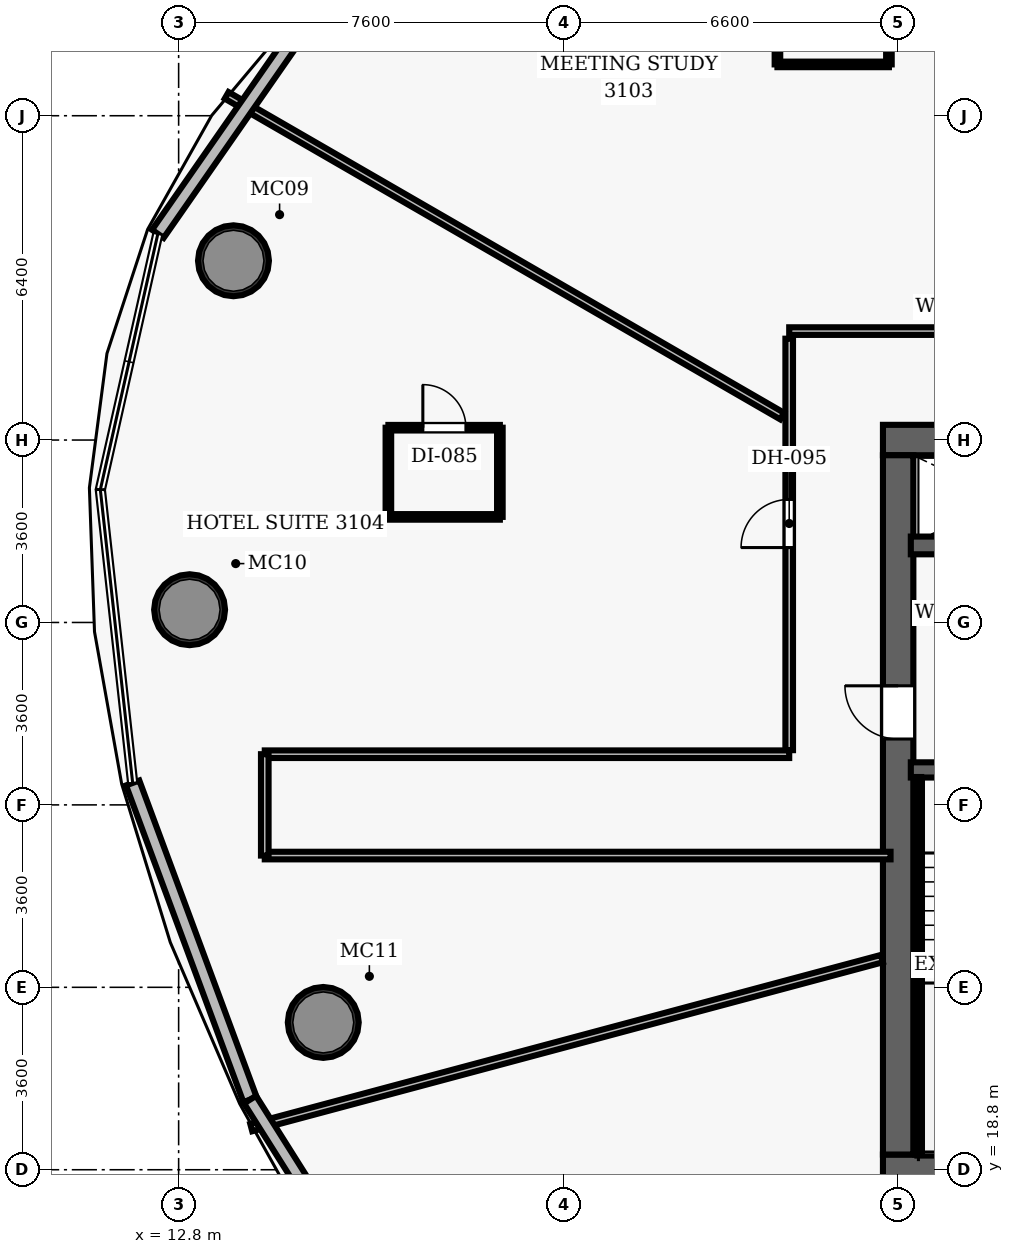
"""IFC4 building model, lengths in metres.
Left out: names, types, materials, properties, quantities, classifications, styles, units other than length and angle.
Written with IfcOpenShell. Run it as: python <this file> out.ifc"""

import sys

from ifc_helpers import new_model, si_unit, direction, frame, frame_2d, origin, origin_2d, place, context, subcontext, project, spatial, rectangle, hollow_circle, extrude, element, fill, save


model = new_model("IFC4")
c1 = context("Model", 3, precision=1e-05, world=origin(), true_north=direction((0.0, 1.0)))
c2 = subcontext(c1, "Body", "Model", "MODEL_VIEW")
j1 = project(units=[si_unit("LENGTHUNIT", "METRE"), si_unit("PLANEANGLEUNIT", "RADIAN")], contexts=[c1])
p1 = place(None, origin())
s1 = spatial("IfcSite", under=j1, at=p1, CompositionType="ELEMENT")
p2 = place(p1, origin())
s2 = spatial("IfcBuilding", under=s1, at=p2, CompositionType="ELEMENT")
p3 = place(p2, frame((0.0, 0.0, 127.3)))
s3 = spatial("IfcBuildingStorey", under=s2, at=p3, CompositionType="ELEMENT", Elevation=127.3)
p4 = place(p3, frame((26.7, 18.8, 0.0), z_axis=(0.0, 0.0, 1.0), x_axis=(1.0, 0.0, 0.0)))
e1 = element("IfcWall", 1, at=p4, inside=s3, PredefinedType="SHEAR", context=c2, shape_type="SweptSolid", body=[
    extrude(rectangle(XDim=22.6, YDim=0.6, at=frame_2d((11.3, 0.0))), origin(), (0.0, 0.0, 1.0), 3.5),
])
p5 = place(p4, frame((14.52, 0.0, 0.0)))
e2 = element("IfcOpeningElement", 2, at=p5, cuts=e1, PredefinedType="OPENING", context=c2, shape_type="SweptSolid", body=[
    extrude(rectangle(XDim=1.05, YDim=2.15, at=frame_2d((0.525, 1.075))), frame((0.0, 0.31, 0.0), z_axis=(0.0, -1.0, 0.0), x_axis=(1.0, 0.0, 0.0)), (0.0, 0.0, 1.0), 0.62),
])
p6 = place(p3, frame((26.7, 33.2, 0.0), z_axis=(0.0, 0.0, 1.0), x_axis=(1.0, 0.0, 0.0)))
e3 = element("IfcWall", 3, at=p6, inside=s3, PredefinedType="SHEAR", context=c2, shape_type="SweptSolid", body=[
    extrude(rectangle(XDim=22.6, YDim=0.6, at=frame_2d((11.3, 0.0))), origin(), (0.0, 0.0, 1.0), 3.5),
])
p7 = place(p6, frame((4.62, 0.0, 0.0)))
e4 = element("IfcOpeningElement", 4, at=p7, cuts=e3, PredefinedType="OPENING", context=c2, shape_type="SweptSolid", body=[
    extrude(rectangle(XDim=1.05, YDim=2.15, at=frame_2d((0.525, 1.075))), frame((0.0, 0.31, 0.0), z_axis=(0.0, -1.0, 0.0), x_axis=(1.0, 0.0, 0.0)), (0.0, 0.0, 1.0), 0.62),
])
p8 = place(p6, frame((14.52, 0.0, 0.0)))
e5 = element("IfcOpeningElement", 5, at=p8, cuts=e3, PredefinedType="OPENING", context=c2, shape_type="SweptSolid", body=[
    extrude(rectangle(XDim=1.05, YDim=2.15, at=frame_2d((0.525, 1.075))), frame((0.0, 0.31, 0.0), z_axis=(0.0, -1.0, 0.0), x_axis=(1.0, 0.0, 0.0)), (0.0, 0.0, 1.0), 0.62),
])
p9 = place(p3, frame((27.0, 19.1, 0.0), z_axis=(0.0, 0.0, 1.0), x_axis=(0.0, 1.0, 0.0)))
e6 = element("IfcWall", 6, at=p9, inside=s3, PredefinedType="SHEAR", context=c2, shape_type="SweptSolid", body=[
    extrude(rectangle(XDim=13.8, YDim=0.6, at=frame_2d((6.9, 0.0))), origin(), (0.0, 0.0, 1.0), 3.5),
])
p10 = place(p9, frame((8.2, 0.0, 0.0)))
e7 = element("IfcOpeningElement", 7, at=p10, cuts=e6, PredefinedType="OPENING", context=c2, shape_type="SweptSolid", body=[
    extrude(rectangle(XDim=1.05, YDim=2.15, at=frame_2d((0.525, 1.075))), frame((0.0, 0.31, 0.0), z_axis=(0.0, -1.0, 0.0), x_axis=(1.0, 0.0, 0.0)), (0.0, 0.0, 1.0), 0.62),
])
for number, where, z_axis, x_axis in (
    (8, (13.882, 36.738, 0.0), (0.0, 0.0, 1.0), (1.0, 0.0, 0.0)),
    (9, (13.016, 29.852, 0.0), (0.0, 0.0, 1.0), (1.0, 0.0, 0.0)),
    (10, (15.654, 21.707, 0.0), (0.0, 0.0, 1.0), (1.0, 0.0, 0.0)),
):
    element("IfcColumn", number, at=place(p3, frame(where, z_axis=z_axis, x_axis=x_axis)), inside=s3, PredefinedType="COLUMN", context=c2, shape_type="SweptSolid", body=[
        extrude(hollow_circle(Radius=0.7, WallThickness=0.055, at=origin_2d()), origin(), (0.0, 0.0, 1.0), 3.5),
    ])
p11 = place(p3, frame((27.25, 26.69, 0.0), z_axis=(0.0, 0.0, 1.0), x_axis=(1.0, 0.0, 0.0)))
e11 = element("IfcWall", 11, at=p11, inside=s3, PredefinedType="SHEAR", context=c2, shape_type="SweptSolid", body=[
    extrude(rectangle(XDim=3.67, YDim=0.3, at=frame_2d((1.835, 0.0))), origin(), (0.0, 0.0, 1.0), 3.5),
])
p12 = place(p11, frame((1.05, 0.0, 0.0)))
e12 = element("IfcOpeningElement", 12, at=p12, cuts=e11, PredefinedType="OPENING", context=c2, shape_type="SweptSolid", body=[
    extrude(rectangle(XDim=1.1, YDim=2.15, at=frame_2d((0.55, 1.075))), frame((0.0, 0.16, 0.0), z_axis=(0.0, -1.0, 0.0), x_axis=(1.0, 0.0, 0.0)), (0.0, 0.0, 1.0), 0.32),
])
p13 = place(p3, frame((27.395, 19.1, 0.0), z_axis=(0.0, 0.0, 1.0), x_axis=(0.0, 1.0, 0.0)))
e13 = element("IfcWall", 13, at=p13, inside=s3, PredefinedType="SHEAR", context=c2, shape_type="SweptSolid", body=[
    extrude(rectangle(XDim=7.45, YDim=0.12, at=frame_2d((3.725, 0.0))), origin(), (0.0, 0.0, 1.0), 3.5),
])
p14 = place(p3, frame((27.395, 19.16, 0.0), z_axis=(0.0, 0.0, 1.0), x_axis=(1.0, 0.0, 0.0)))
e14 = element("IfcWall", 14, at=p14, inside=s3, PredefinedType="SHEAR", context=c2, shape_type="SweptSolid", body=[
    extrude(rectangle(XDim=3.095, YDim=0.12, at=frame_2d((1.547, 0.0))), origin(), (0.0, 0.0, 1.0), 3.5),
])
p15 = place(p3, frame((27.25, 31.12, 0.0), z_axis=(0.0, 0.0, 1.0), x_axis=(1.0, 0.0, 0.0)))
e15 = element("IfcWall", 15, at=p15, inside=s3, PredefinedType="SHEAR", context=c2, shape_type="SweptSolid", body=[
    extrude(rectangle(XDim=3.67, YDim=0.35, at=frame_2d((1.835, 0.0))), origin(), (0.0, 0.0, 1.0), 2.675),
])
p16 = place(p15, frame((1.25, 0.0, 0.0)))
e16 = element("IfcOpeningElement", 16, at=p16, cuts=e15, PredefinedType="OPENING", context=c2, shape_type="SweptSolid", body=[
    extrude(rectangle(XDim=1.1, YDim=2.15, at=frame_2d((0.55, 1.075))), frame((0.0, 0.185, 0.0), z_axis=(0.0, -1.0, 0.0), x_axis=(1.0, 0.0, 0.0)), (0.0, 0.0, 1.0), 0.37),
])
p17 = place(p3, frame((24.85, 35.35, 0.0), z_axis=(0.0, 0.0, 1.0), x_axis=(1.0, 0.0, 0.0)))
e17 = element("IfcWall", 17, at=p17, inside=s3, PredefinedType="PARTITIONING", context=c2, shape_type="SweptSolid", body=[
    extrude(rectangle(XDim=26.0, YDim=0.15, at=frame_2d((13.0, 0.0))), origin(), (0.0, 0.0, 1.0), 2.675),
])
p18 = place(p17, frame((19.766, 0.0, 0.0)))
e18 = element("IfcOpeningElement", 18, at=p18, cuts=e17, PredefinedType="OPENING", context=c2, shape_type="SweptSolid", body=[
    extrude(rectangle(XDim=0.95, YDim=2.15, at=frame_2d((0.475, 1.075))), frame((0.0, 0.085, 0.0), z_axis=(0.0, -1.0, 0.0), x_axis=(1.0, 0.0, 0.0)), (0.0, 0.0, 1.0), 0.17),
])
p19 = place(p17, frame((12.852, 0.0, 0.0)))
e19 = element("IfcOpeningElement", 19, at=p19, cuts=e17, PredefinedType="OPENING", context=c2, shape_type="SweptSolid", body=[
    extrude(rectangle(XDim=0.95, YDim=2.15, at=frame_2d((0.475, 1.075))), frame((0.0, 0.085, 0.0), z_axis=(0.0, -1.0, 0.0), x_axis=(1.0, 0.0, 0.0)), (0.0, 0.0, 1.0), 0.17),
])
p20 = place(p17, frame((6.616, 0.0, 0.0)))
e20 = element("IfcOpeningElement", 20, at=p20, cuts=e17, PredefinedType="OPENING", context=c2, shape_type="SweptSolid", body=[
    extrude(rectangle(XDim=0.95, YDim=2.15, at=frame_2d((0.475, 1.075))), frame((0.0, 0.085, 0.0), z_axis=(0.0, -1.0, 0.0), x_axis=(1.0, 0.0, 0.0)), (0.0, 0.0, 1.0), 0.17),
])
p21 = place(p3, frame((24.85, 27.08, 0.0), z_axis=(0.0, 0.0, 1.0), x_axis=(0.0, 1.0, 0.0)))
e21 = element("IfcWall", 21, at=p21, inside=s3, PredefinedType="PARTITIONING", context=c2, shape_type="SweptSolid", body=[
    extrude(rectangle(XDim=8.12, YDim=0.15, at=frame_2d((4.06, 0.0))), origin(), (0.0, 0.0, 1.0), 2.675),
])
p22 = place(p21, frame((3.998, 0.0, 0.0)))
e22 = element("IfcOpeningElement", 22, at=p22, cuts=e21, PredefinedType="OPENING", context=c2, shape_type="SweptSolid", body=[
    extrude(rectangle(XDim=0.95, YDim=2.15, at=frame_2d((0.475, 1.075))), frame((0.0, 0.085, 0.0), z_axis=(0.0, -1.0, 0.0), x_axis=(1.0, 0.0, 0.0)), (0.0, 0.0, 1.0), 0.17),
])
p23 = place(p3, frame((14.5, 27.0, 0.0), z_axis=(0.0, 0.0, 1.0), x_axis=(1.0, 0.0, 0.0)))
e23 = element("IfcWall", 23, at=p23, inside=s3, PredefinedType="PARTITIONING", context=c2, shape_type="SweptSolid", body=[
    extrude(rectangle(XDim=10.35, YDim=0.15, at=frame_2d((5.175, 0.0))), origin(), (0.0, 0.0, 1.0), 2.675),
])
p24 = place(p3, frame((14.5, 25.0, 0.0), z_axis=(0.0, 0.0, 1.0), x_axis=(1.0, 0.0, 0.0)))
e24 = element("IfcWall", 24, at=p24, inside=s3, PredefinedType="PARTITIONING", context=c2, shape_type="SweptSolid", body=[
    extrude(rectangle(XDim=12.35, YDim=0.15, at=frame_2d((6.175, 0.0))), origin(), (0.0, 0.0, 1.0), 2.675),
])
p25 = place(p3, frame((14.5, 25.0, 0.0), z_axis=(0.0, 0.0, 1.0), x_axis=(0.0, 1.0, 0.0)))
e25 = element("IfcWall", 25, at=p25, inside=s3, PredefinedType="PARTITIONING", context=c2, shape_type="SweptSolid", body=[
    extrude(rectangle(XDim=2.0, YDim=0.15, at=frame_2d((1.0, 0.0))), origin(), (0.0, 0.0, 1.0), 2.675),
])
p26 = place(p3, frame((24.71, 33.673, 0.0), z_axis=(0.0, 0.0, 1.0), x_axis=(-0.866026921982, 0.499997370395, 0.0)))
e26 = element("IfcWall", 26, at=p26, inside=s3, PredefinedType="PARTITIONING", context=c2, shape_type="SweptSolid", body=[
    extrude(rectangle(XDim=12.658, YDim=0.15, at=frame_2d((6.329, 0.0))), origin(), (0.0, 0.0, 1.0), 2.675),
])
p27 = place(p3, frame((26.68, 22.967, 0.0), z_axis=(0.0, 0.0, 1.0), x_axis=(-0.965923864026, -0.258826368257, 0.0)))
e27 = element("IfcWall", 27, at=p27, inside=s3, PredefinedType="PARTITIONING", context=c2, shape_type="SweptSolid", body=[
    extrude(rectangle(XDim=12.886, YDim=0.15, at=frame_2d((6.443, 0.0))), origin(), (0.0, 0.0, 1.0), 2.675),
])
p28 = place(p3, frame((24.618, 40.613, 0.0), z_axis=(0.0, 0.0, 1.0), x_axis=(1.0, 0.0, 0.0)))
e28 = element("IfcWall", 28, at=p28, inside=s3, PredefinedType="PARTITIONING", context=c2, shape_type="SweptSolid", body=[
    extrude(rectangle(XDim=2.2, YDim=0.11, at=frame_2d((1.1, 0.0))), origin(), (0.0, 0.0, 1.0), 2.675),
])
for number, where, z_axis, x_axis in (
    (29, (24.618, 40.613, 0.0), (0.0, 0.0, 1.0), (0.0, 1.0, 0.0)),
    (30, (26.818, 40.613, 0.0), (0.0, 0.0, 1.0), (0.0, 1.0, 0.0)),
):
    element("IfcWall", number, at=place(p3, frame(where, z_axis=z_axis, x_axis=x_axis)), inside=s3, PredefinedType="PARTITIONING", context=c2, shape_type="SweptSolid", body=[
        extrude(rectangle(XDim=1.76, YDim=0.11, at=frame_2d((0.88, 0.0))), origin(), (0.0, 0.0, 1.0), 2.675),
    ])
p29 = place(p3, frame((16.94, 31.683, 0.0), z_axis=(0.0, 0.0, 1.0), x_axis=(1.0, 0.0, 0.0)))
e31 = element("IfcWall", 31, at=p29, inside=s3, PredefinedType="PARTITIONING", context=c2, shape_type="SweptSolid", body=[
    extrude(rectangle(XDim=2.2, YDim=0.11, at=frame_2d((1.1, 0.0))), origin(), (0.0, 0.0, 1.0), 2.675),
])
p30 = place(p3, frame((16.94, 33.443, 0.0), z_axis=(0.0, 0.0, 1.0), x_axis=(1.0, 0.0, 0.0)))
e32 = element("IfcWall", 32, at=p30, inside=s3, PredefinedType="PARTITIONING", context=c2, shape_type="SweptSolid", body=[
    extrude(rectangle(XDim=2.2, YDim=0.11, at=frame_2d((1.1, 0.0))), origin(), (0.0, 0.0, 1.0), 2.675),
])
p31 = place(p30, frame((0.68, 0.0, 0.0)))
e33 = element("IfcOpeningElement", 33, at=p31, cuts=e32, PredefinedType="OPENING", context=c2, shape_type="SweptSolid", body=[
    extrude(rectangle(XDim=0.85, YDim=2.1, at=frame_2d((0.425, 1.05))), frame((0.0, 0.065, 0.0), z_axis=(0.0, -1.0, 0.0), x_axis=(1.0, 0.0, 0.0)), (0.0, 0.0, 1.0), 0.13),
])
for number, where, z_axis, x_axis in (
    (34, (16.94, 31.683, 0.0), (0.0, 0.0, 1.0), (0.0, 1.0, 0.0)),
    (35, (19.14, 31.683, 0.0), (0.0, 0.0, 1.0), (0.0, 1.0, 0.0)),
):
    element("IfcWall", number, at=place(p3, frame(where, z_axis=z_axis, x_axis=x_axis)), inside=s3, PredefinedType="PARTITIONING", context=c2, shape_type="SweptSolid", body=[
        extrude(rectangle(XDim=1.76, YDim=0.11, at=frame_2d((0.88, 0.0))), origin(), (0.0, 0.0, 1.0), 2.675),
    ])
p32 = place(p3, frame((12.39, 37.269, 0.0), z_axis=(0.0, 0.0, 1.0), x_axis=(0.571097665785, 0.820882120731, 0.0)))
e36 = element("IfcWall", 36, at=p32, inside=s3, PredefinedType="SOLIDWALL", context=c2, shape_type="SweptSolid", body=[
    extrude(rectangle(XDim=5.174, YDim=0.28, at=frame_2d((2.587, 0.0))), origin(), (0.0, 0.0, 1.0), 3.26),
])
p33 = place(p3, frame((14.209, 20.183, 0.0), z_axis=(0.0, 0.0, 1.0), x_axis=(-0.347548177942, 0.937662126786, 0.0)))
e37 = element("IfcWall", 37, at=p33, inside=s3, PredefinedType="SOLIDWALL", context=c2, shape_type="SweptSolid", body=[
    extrude(rectangle(XDim=6.665, YDim=0.28, at=frame_2d((3.333, 0.0))), origin(), (0.0, 0.0, 1.0), 3.26),
])
p34 = place(p3, frame((18.097, 14.015, 0.0), z_axis=(0.0, 0.0, 1.0), x_axis=(-0.533248317784, 0.845958764705, 0.0)))
e38 = element("IfcWall", 38, at=p34, inside=s3, PredefinedType="SOLIDWALL", context=c2, shape_type="SweptSolid", body=[
    extrude(rectangle(XDim=7.292, YDim=0.28, at=frame_2d((3.646, 0.0))), origin(), (0.0, 0.0, 1.0), 3.26),
])
p35 = place(p10, origin())
e39 = element("IfcDoor", 39, at=p35, inside=s3, OperationType="SINGLE_SWING_RIGHT", PredefinedType="DOOR", context=c2, shape_type="SweptSolid", body=[
    extrude(rectangle(XDim=1.05, YDim=2.15, at=frame_2d((0.525, 1.075))), frame((0.0, 0.025, 0.0), z_axis=(0.0, -1.0, 0.0), x_axis=(1.0, 0.0, 0.0)), (0.0, 0.0, 1.0), 0.05),
])
fill(e7, e39)
p36 = place(p22, origin())
e40 = element("IfcDoor", 40, at=p36, inside=s3, OperationType="SINGLE_SWING_LEFT", PredefinedType="DOOR", context=c2, shape_type="SweptSolid", body=[
    extrude(rectangle(XDim=0.95, YDim=2.15, at=frame_2d((0.475, 1.075))), frame((0.0, 0.025, 0.0), z_axis=(0.0, -1.0, 0.0), x_axis=(1.0, 0.0, 0.0)), (0.0, 0.0, 1.0), 0.05),
])
fill(e22, e40)
p37 = place(p31, origin())
e41 = element("IfcDoor", 41, at=p37, inside=s3, OperationType="SINGLE_SWING_LEFT", PredefinedType="DOOR", context=c2, shape_type="SweptSolid", body=[
    extrude(rectangle(XDim=0.85, YDim=2.1, at=frame_2d((0.425, 1.05))), frame((0.0, 0.025, 0.0), z_axis=(0.0, -1.0, 0.0), x_axis=(1.0, 0.0, 0.0)), (0.0, 0.0, 1.0), 0.05),
])
fill(e33, e41)
save(model, sys.argv[1])
